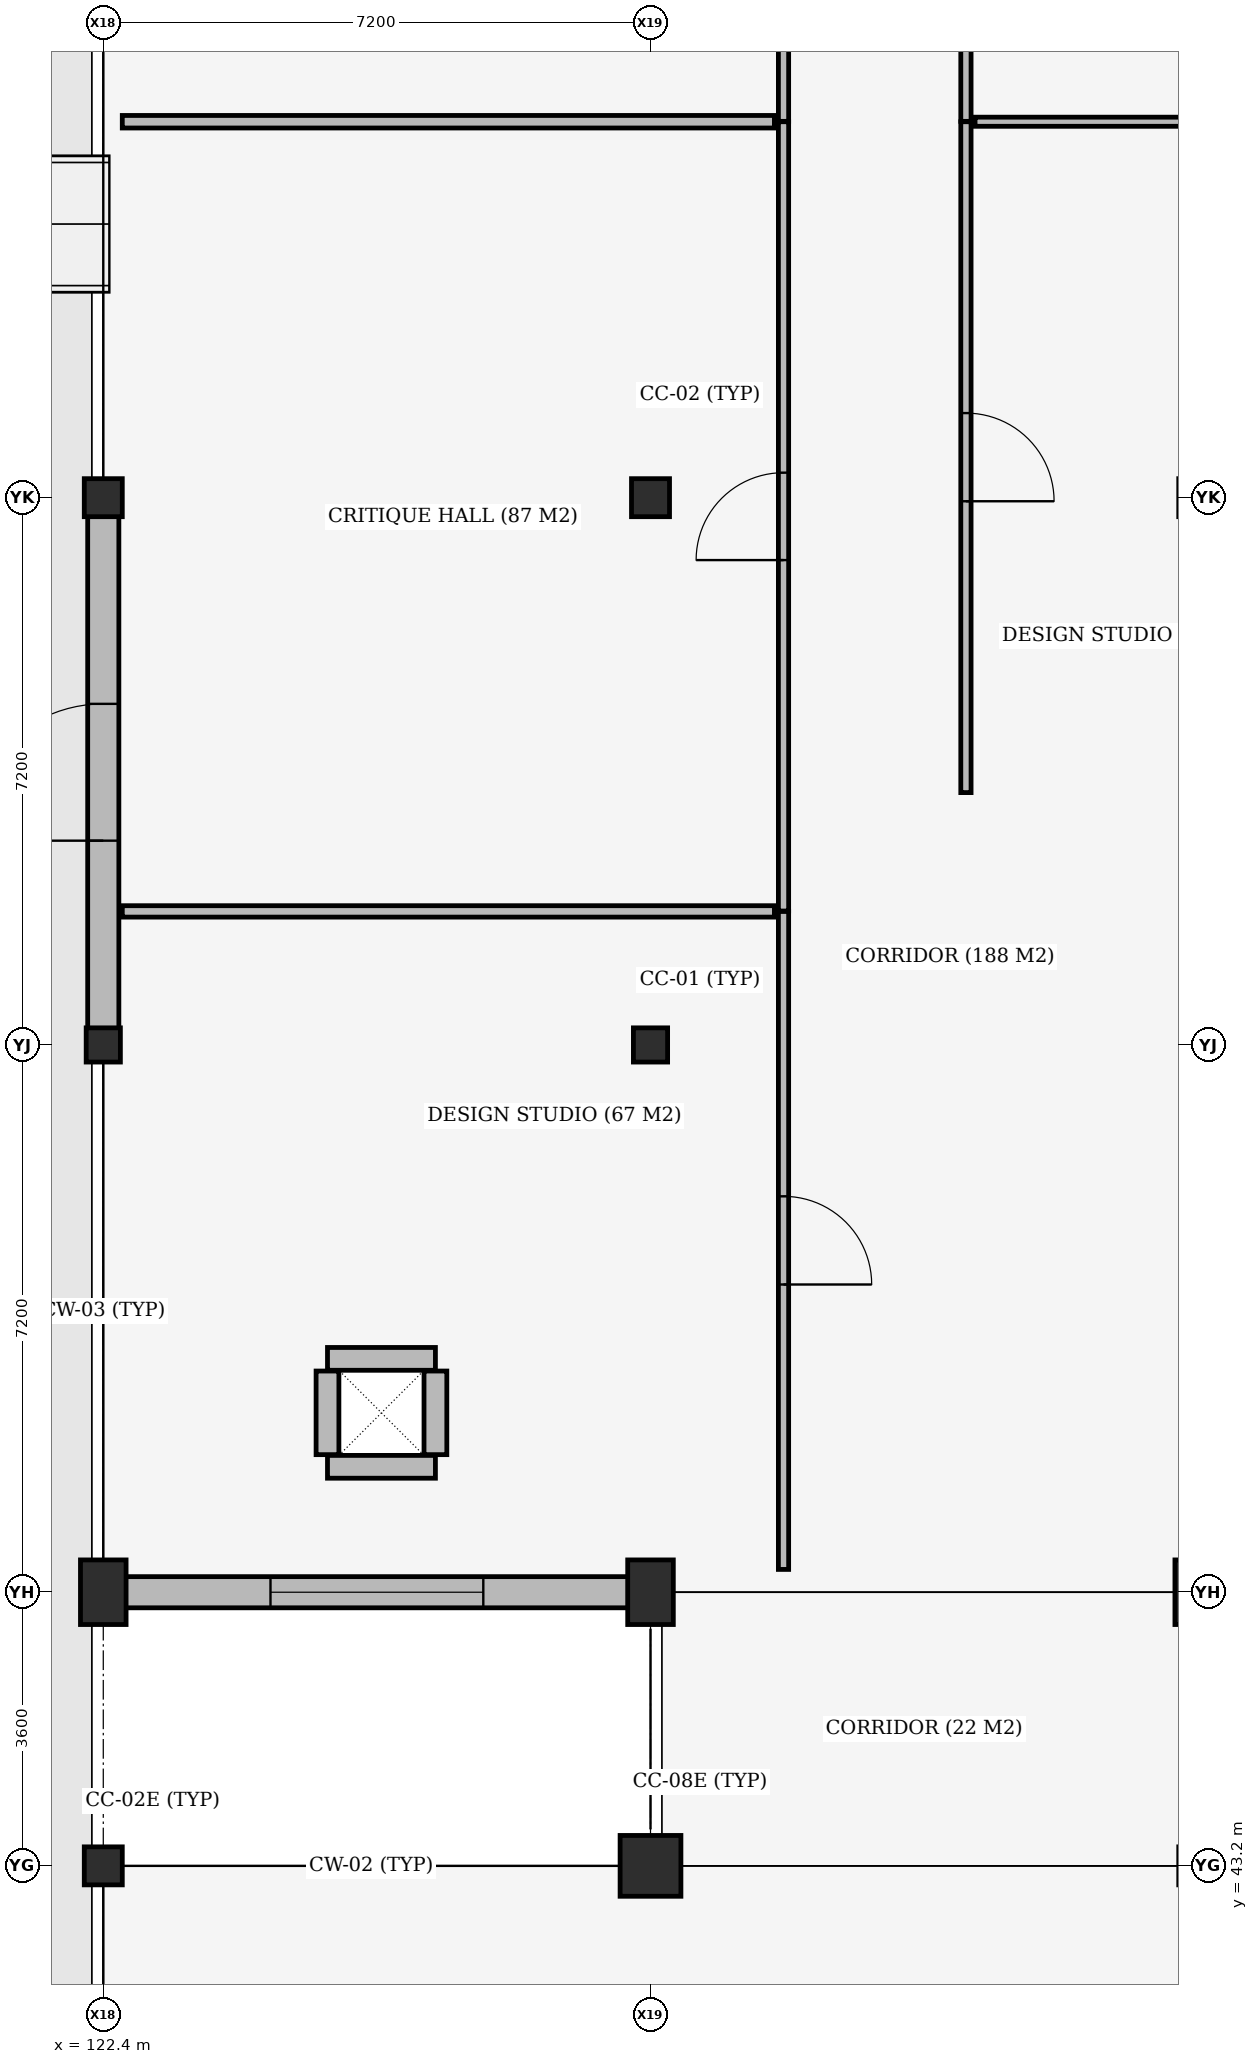
"""IFC4 building model, lengths in metres.
Left out: names, types, materials, properties, quantities, classifications, styles, units other than length and angle.
Written with IfcOpenShell. Run it as: python <this file> out.ifc"""

import sys

from ifc_helpers import new_model, si_unit, direction, frame, frame_2d, origin, origin_2d, place, context, subcontext, project, spatial, rectangle, extrude, element, fill, save


model = new_model("IFC4")
c1 = context("Model", 3, precision=1e-05, world=origin(), true_north=direction((0.0, 1.0)))
c2 = subcontext(c1, "Body", "Model", "MODEL_VIEW")
j1 = project(units=[si_unit("LENGTHUNIT", "METRE"), si_unit("PLANEANGLEUNIT", "RADIAN")], contexts=[c1])
p1 = place(None, origin())
s1 = spatial("IfcSite", under=j1, at=p1, CompositionType="ELEMENT")
p2 = place(p1, origin())
s2 = spatial("IfcBuilding", under=s1, at=p2, CompositionType="ELEMENT")
p3 = place(p2, origin())
s3 = spatial("IfcBuildingStorey", under=s2, at=p3, CompositionType="ELEMENT", Elevation=0.0)
p4 = place(p3, frame((125.35, 48.45, 0.0), z_axis=(0.0, 0.0, 1.0), x_axis=(1.0, 0.0, 0.0)))
e1 = element("IfcWall", 1, at=p4, inside=s3, PredefinedType="SHEAR", context=c2, shape_type="SweptSolid", body=[
    extrude(rectangle(XDim=1.42, YDim=0.3, at=frame_2d((0.71, 0.0))), origin(), (0.0, 0.0, 1.0), 5.16),
])
p5 = place(p3, frame((126.77, 48.61, 0.0), z_axis=(0.0, 0.0, 1.0), x_axis=(0.0, 1.0, 0.0)))
e2 = element("IfcWall", 2, at=p5, inside=s3, PredefinedType="SHEAR", context=c2, shape_type="SweptSolid", body=[
    extrude(rectangle(XDim=1.1, YDim=0.3, at=frame_2d((0.55, 0.0))), origin(), (0.0, 0.0, 1.0), 5.16),
])
p6 = place(p3, frame((126.77, 49.87, 0.0), z_axis=(0.0, 0.0, 1.0), x_axis=(-1.0, 0.0, 0.0)))
e3 = element("IfcWall", 3, at=p6, inside=s3, PredefinedType="SHEAR", context=c2, shape_type="SweptSolid", body=[
    extrude(rectangle(XDim=1.42, YDim=0.3, at=frame_2d((0.71, 0.0))), origin(), (0.0, 0.0, 1.0), 5.16),
])
p7 = place(p3, frame((125.35, 49.71, 0.0), z_axis=(0.0, 0.0, 1.0), x_axis=(0.0, -1.0, 0.0)))
e4 = element("IfcWall", 4, at=p7, inside=s3, PredefinedType="SHEAR", context=c2, shape_type="SweptSolid", body=[
    extrude(rectangle(XDim=1.1, YDim=0.3, at=frame_2d((0.55, 0.0))), origin(), (0.0, 0.0, 1.0), 5.16),
])
p8 = place(p3, frame((122.4, 43.2, 0.0), z_axis=(0.0, 0.0, 1.0), x_axis=(1.0, 0.0, 0.0)))
e5 = element("IfcColumn", 5, at=p8, inside=s3, PredefinedType="COLUMN", context=c2, shape_type="SweptSolid", body=[
    extrude(rectangle(XDim=0.5, YDim=0.5, at=origin_2d()), origin(), (0.0, 0.0, 1.0), 5.1),
])
p9 = place(p3, frame((129.6, 43.2, 0.0), z_axis=(0.0, 0.0, 1.0), x_axis=(1.0, 0.0, 0.0)))
e6 = element("IfcColumn", 6, at=p9, inside=s3, PredefinedType="COLUMN", context=c2, shape_type="SweptSolid", body=[
    extrude(rectangle(XDim=0.8, YDim=0.8, at=origin_2d()), origin(), (0.0, 0.0, 1.0), 5.1),
])
p10 = place(p3, frame((122.4, 46.8, 0.0), z_axis=(0.0, 0.0, 1.0), x_axis=(1.0, 0.0, 0.0)))
e7 = element("IfcColumn", 7, at=p10, inside=s3, PredefinedType="COLUMN", context=c2, shape_type="SweptSolid", body=[
    extrude(rectangle(XDim=0.6, YDim=0.85, at=origin_2d()), origin(), (0.0, 0.0, 1.0), 5.1),
])
p11 = place(p3, frame((122.4, 54.0, 0.0), z_axis=(0.0, 0.0, 1.0), x_axis=(1.0, 0.0, 0.0)))
e8 = element("IfcColumn", 8, at=p11, inside=s3, PredefinedType="COLUMN", context=c2, shape_type="SweptSolid", body=[
    extrude(rectangle(XDim=0.45, YDim=0.45, at=origin_2d()), origin(), (0.0, 0.0, 1.0), 5.1),
])
p12 = place(p3, frame((122.4, 61.2, 0.0), z_axis=(0.0, 0.0, 1.0), x_axis=(1.0, 0.0, 0.0)))
e9 = element("IfcColumn", 9, at=p12, inside=s3, PredefinedType="COLUMN", context=c2, shape_type="SweptSolid", body=[
    extrude(rectangle(XDim=0.5, YDim=0.5, at=origin_2d()), origin(), (0.0, 0.0, 1.0), 5.1),
])
p13 = place(p3, frame((129.6, 46.8, 0.0), z_axis=(0.0, 0.0, 1.0), x_axis=(1.0, 0.0, 0.0)))
e10 = element("IfcColumn", 10, at=p13, inside=s3, PredefinedType="COLUMN", context=c2, shape_type="SweptSolid", body=[
    extrude(rectangle(XDim=0.6, YDim=0.85, at=origin_2d()), origin(), (0.0, 0.0, 1.0), 5.1),
])
p14 = place(p3, frame((129.6, 54.0, 0.0), z_axis=(0.0, 0.0, 1.0), x_axis=(1.0, 0.0, 0.0)))
e11 = element("IfcColumn", 11, at=p14, inside=s3, PredefinedType="COLUMN", context=c2, shape_type="SweptSolid", body=[
    extrude(rectangle(XDim=0.45, YDim=0.45, at=origin_2d()), origin(), (0.0, 0.0, 1.0), 5.1),
])
p15 = place(p3, frame((129.6, 61.2, 0.0), z_axis=(0.0, 0.0, 1.0), x_axis=(1.0, 0.0, 0.0)))
e12 = element("IfcColumn", 12, at=p15, inside=s3, PredefinedType="COLUMN", context=c2, shape_type="SweptSolid", body=[
    extrude(rectangle(XDim=0.5, YDim=0.5, at=origin_2d()), origin(), (0.0, 0.0, 1.0), 5.1),
])
p16 = place(p3, frame((136.8, 46.8, 0.0), z_axis=(0.0, 0.0, 1.0), x_axis=(1.0, 0.0, 0.0)))
e13 = element("IfcColumn", 13, at=p16, inside=s3, PredefinedType="COLUMN", context=c2, shape_type="SweptSolid", body=[
    extrude(rectangle(XDim=0.6, YDim=0.85, at=origin_2d()), origin(), (0.0, 0.0, 1.0), 5.1),
])
p17 = place(p3, frame((129.308, 46.8, 0.0), z_axis=(0.0, 0.0, 1.0), x_axis=(-1.0, 0.0, 0.0)))
e14 = element("IfcWall", 14, at=p17, inside=s3, PredefinedType="STANDARD", context=c2, shape_type="SweptSolid", body=[
    extrude(rectangle(XDim=6.616, YDim=0.41, at=frame_2d((3.308, 0.0))), origin(), (0.0, 0.0, 1.0), 4.45),
])
p18 = place(p17, frame((1.908, 0.0, 0.85)))
e15 = element("IfcOpeningElement", 15, at=p18, cuts=e14, PredefinedType="OPENING", context=c2, shape_type="SweptSolid", body=[
    extrude(rectangle(XDim=2.8, YDim=2.4, at=frame_2d((1.4, 1.2))), frame((0.0, 0.215, 0.0), z_axis=(0.0, -1.0, 0.0), x_axis=(1.0, 0.0, 0.0)), (0.0, 0.0, 1.0), 0.43),
])
p19 = place(p3, frame((122.4, 54.217, 0.0), z_axis=(0.0, 0.0, 1.0), x_axis=(0.0, 1.0, 0.0)))
e16 = element("IfcWall", 16, at=p19, inside=s3, PredefinedType="STANDARD", context=c2, shape_type="SweptSolid", body=[
    extrude(rectangle(XDim=6.741, YDim=0.41, at=frame_2d((3.371, 0.0))), origin(), (0.0, 0.0, 1.0), 4.35),
])
p20 = place(p19, frame((2.47, 0.0, 0.0)))
e17 = element("IfcOpeningElement", 17, at=p20, cuts=e16, PredefinedType="OPENING", context=c2, shape_type="SweptSolid", body=[
    extrude(rectangle(XDim=1.8, YDim=2.2, at=frame_2d((0.9, 1.1))), frame((0.0, 0.215, 0.0), z_axis=(0.0, -1.0, 0.0), x_axis=(1.0, 0.0, 0.0)), (0.0, 0.0, 1.0), 0.43),
])
p21 = place(p3, frame((131.35, 47.1, 0.0), z_axis=(0.0, 0.0, 1.0), x_axis=(0.0, 1.0, 0.0)))
e18 = element("IfcWall", 18, at=p21, inside=s3, PredefinedType="PARTITIONING", context=c2, shape_type="SweptSolid", body=[
    extrude(rectangle(XDim=8.657, YDim=0.135, at=frame_2d((4.329, 0.0))), origin(), (0.0, 0.0, 1.0), 4.3),
])
p22 = place(p21, frame((3.749, 0.0, 0.0)))
e19 = element("IfcOpeningElement", 19, at=p22, cuts=e18, PredefinedType="OPENING", context=c2, shape_type="SweptSolid", body=[
    extrude(rectangle(XDim=1.16, YDim=2.2, at=frame_2d((0.58, 1.1))), frame((0.0, 0.077, 0.0), z_axis=(0.0, -1.0, 0.0), x_axis=(1.0, 0.0, 0.0)), (0.0, 0.0, 1.0), 0.155),
])
p23 = place(p3, frame((122.65, 55.757, 0.0), z_axis=(0.0, 0.0, 1.0), x_axis=(1.0, 0.0, 0.0)))
e20 = element("IfcWall", 20, at=p23, inside=s3, PredefinedType="PARTITIONING", context=c2, shape_type="SweptSolid", body=[
    extrude(rectangle(XDim=8.58, YDim=0.15, at=frame_2d((4.29, 0.0))), origin(), (0.0, 0.0, 1.0), 4.4),
])
p24 = place(p3, frame((131.35, 55.762, 0.0), z_axis=(0.0, 0.0, 1.0), x_axis=(0.0, 1.0, 0.0)))
e21 = element("IfcWall", 21, at=p24, inside=s3, PredefinedType="PARTITIONING", context=c2, shape_type="SweptSolid", body=[
    extrude(rectangle(XDim=10.384, YDim=0.135, at=frame_2d((5.192, 0.0))), origin(), (0.0, 0.0, 1.0), 4.45),
])
p25 = place(p24, frame((4.617, 0.0, 0.0)))
e22 = element("IfcOpeningElement", 22, at=p25, cuts=e21, PredefinedType="OPENING", context=c2, shape_type="SweptSolid", body=[
    extrude(rectangle(XDim=1.15, YDim=2.2, at=frame_2d((0.575, 1.1))), frame((0.0, 0.077, 0.0), z_axis=(0.0, -1.0, 0.0), x_axis=(1.0, 0.0, 0.0)), (0.0, 0.0, 1.0), 0.155),
])
p26 = place(p3, frame((122.65, 66.146, 0.0), z_axis=(0.0, 0.0, 1.0), x_axis=(1.0, 0.0, 0.0)))
e23 = element("IfcWall", 23, at=p26, inside=s3, PredefinedType="PARTITIONING", context=c2, shape_type="SweptSolid", body=[
    extrude(rectangle(XDim=8.58, YDim=0.165, at=frame_2d((4.29, 0.0))), origin(), (0.0, 0.0, 1.0), 4.35),
])
p27 = place(p3, frame((131.35, 66.151, 0.0), z_axis=(0.0, 0.0, 1.0), x_axis=(0.0, 1.0, 0.0)))
e24 = element("IfcWall", 24, at=p27, inside=s3, PredefinedType="PARTITIONING", context=c2, shape_type="SweptSolid", body=[
    extrude(rectangle(XDim=3.244, YDim=0.135, at=frame_2d((1.622, 0.0))), origin(), (0.0, 0.0, 1.0), 4.35),
])
p28 = place(p27, frame((1.042, 0.0, 0.0)))
e25 = element("IfcOpeningElement", 25, at=p28, cuts=e24, PredefinedType="OPENING", context=c2, shape_type="SweptSolid", body=[
    extrude(rectangle(XDim=1.16, YDim=2.2, at=frame_2d((0.58, 1.1))), frame((0.0, 0.077, 0.0), z_axis=(0.0, -1.0, 0.0), x_axis=(1.0, 0.0, 0.0)), (0.0, 0.0, 1.0), 0.155),
])
p29 = place(p3, frame((133.75, 57.32, 0.0), z_axis=(0.0, 0.0, 1.0), x_axis=(0.0, 1.0, 0.0)))
e26 = element("IfcWall", 26, at=p29, inside=s3, PredefinedType="PARTITIONING", context=c2, shape_type="SweptSolid", body=[
    extrude(rectangle(XDim=8.826, YDim=0.135, at=frame_2d((4.413, 0.0))), origin(), (0.0, 0.0, 1.0), 4.45),
])
p30 = place(p29, frame((3.833, 0.0, 0.0)))
e27 = element("IfcOpeningElement", 27, at=p30, cuts=e26, PredefinedType="OPENING", context=c2, shape_type="SweptSolid", body=[
    extrude(rectangle(XDim=1.16, YDim=2.2, at=frame_2d((0.58, 1.1))), frame((0.0, 0.077, 0.0), z_axis=(0.0, -1.0, 0.0), x_axis=(1.0, 0.0, 0.0)), (0.0, 0.0, 1.0), 0.155),
])
p31 = place(p3, frame((133.87, 66.146, 0.0), z_axis=(0.0, 0.0, 1.0), x_axis=(1.0, 0.0, 0.0)))
e28 = element("IfcWall", 28, at=p31, inside=s3, PredefinedType="PARTITIONING", context=c2, shape_type="SweptSolid", body=[
    extrude(rectangle(XDim=26.11, YDim=0.12, at=frame_2d((13.055, 0.0))), origin(), (0.0, 0.0, 1.0), 4.45),
])
p32 = place(p3, frame((133.75, 66.151, 0.0), z_axis=(0.0, 0.0, 1.0), x_axis=(0.0, 1.0, 0.0)))
e29 = element("IfcWall", 29, at=p32, inside=s3, PredefinedType="PARTITIONING", context=c2, shape_type="SweptSolid", body=[
    extrude(rectangle(XDim=3.244, YDim=0.135, at=frame_2d((1.622, 0.0))), origin(), (0.0, 0.0, 1.0), 4.35),
])
p33 = place(p32, frame((1.047, 0.0, 0.0)))
e30 = element("IfcOpeningElement", 30, at=p33, cuts=e29, PredefinedType="OPENING", context=c2, shape_type="SweptSolid", body=[
    extrude(rectangle(XDim=1.15, YDim=2.2, at=frame_2d((0.575, 1.1))), frame((0.0, 0.077, 0.0), z_axis=(0.0, -1.0, 0.0), x_axis=(1.0, 0.0, 0.0)), (0.0, 0.0, 1.0), 0.155),
])
p34 = place(p18, origin())
e31 = element("IfcWindow", 31, at=p34, inside=s3, PartitioningType="DOUBLE_PANEL_VERTICAL", PredefinedType="WINDOW", context=c2, shape_type="SweptSolid", body=[
    extrude(rectangle(XDim=2.8, YDim=2.4, at=frame_2d((1.4, 1.2))), frame((0.0, 0.03, 0.0), z_axis=(0.0, -1.0, 0.0), x_axis=(1.0, 0.0, 0.0)), (0.0, 0.0, 1.0), 0.06),
])
fill(e15, e31)
p35 = place(p20, origin())
e32 = element("IfcDoor", 32, at=p35, inside=s3, OperationType="DOUBLE_DOOR_SINGLE_SWING", PredefinedType="DOOR", context=c2, shape_type="SweptSolid", body=[
    extrude(rectangle(XDim=1.8, YDim=2.2, at=frame_2d((0.9, 1.1))), frame((0.0, 0.025, 0.0), z_axis=(0.0, -1.0, 0.0), x_axis=(1.0, 0.0, 0.0)), (0.0, 0.0, 1.0), 0.05),
])
fill(e17, e32)
p36 = place(p22, origin())
e33 = element("IfcDoor", 33, at=p36, inside=s3, OperationType="SINGLE_SWING_RIGHT", PredefinedType="DOOR", context=c2, shape_type="SweptSolid", body=[
    extrude(rectangle(XDim=1.16, YDim=2.2, at=frame_2d((0.58, 1.1))), frame((0.0, 0.025, 0.0), z_axis=(0.0, -1.0, 0.0), x_axis=(1.0, 0.0, 0.0)), (0.0, 0.0, 1.0), 0.05),
])
fill(e19, e33)
p37 = place(p25, origin())
e34 = element("IfcDoor", 34, at=p37, inside=s3, OperationType="SINGLE_SWING_LEFT", PredefinedType="DOOR", context=c2, shape_type="SweptSolid", body=[
    extrude(rectangle(XDim=1.15, YDim=2.2, at=frame_2d((0.575, 1.1))), frame((0.0, 0.025, 0.0), z_axis=(0.0, -1.0, 0.0), x_axis=(1.0, 0.0, 0.0)), (0.0, 0.0, 1.0), 0.05),
])
fill(e22, e34)
p38 = place(p30, origin())
e35 = element("IfcDoor", 35, at=p38, inside=s3, OperationType="SINGLE_SWING_RIGHT", PredefinedType="DOOR", context=c2, shape_type="SweptSolid", body=[
    extrude(rectangle(XDim=1.16, YDim=2.2, at=frame_2d((0.58, 1.1))), frame((0.0, 0.025, 0.0), z_axis=(0.0, -1.0, 0.0), x_axis=(1.0, 0.0, 0.0)), (0.0, 0.0, 1.0), 0.05),
])
fill(e27, e35)
save(model, sys.argv[1])
